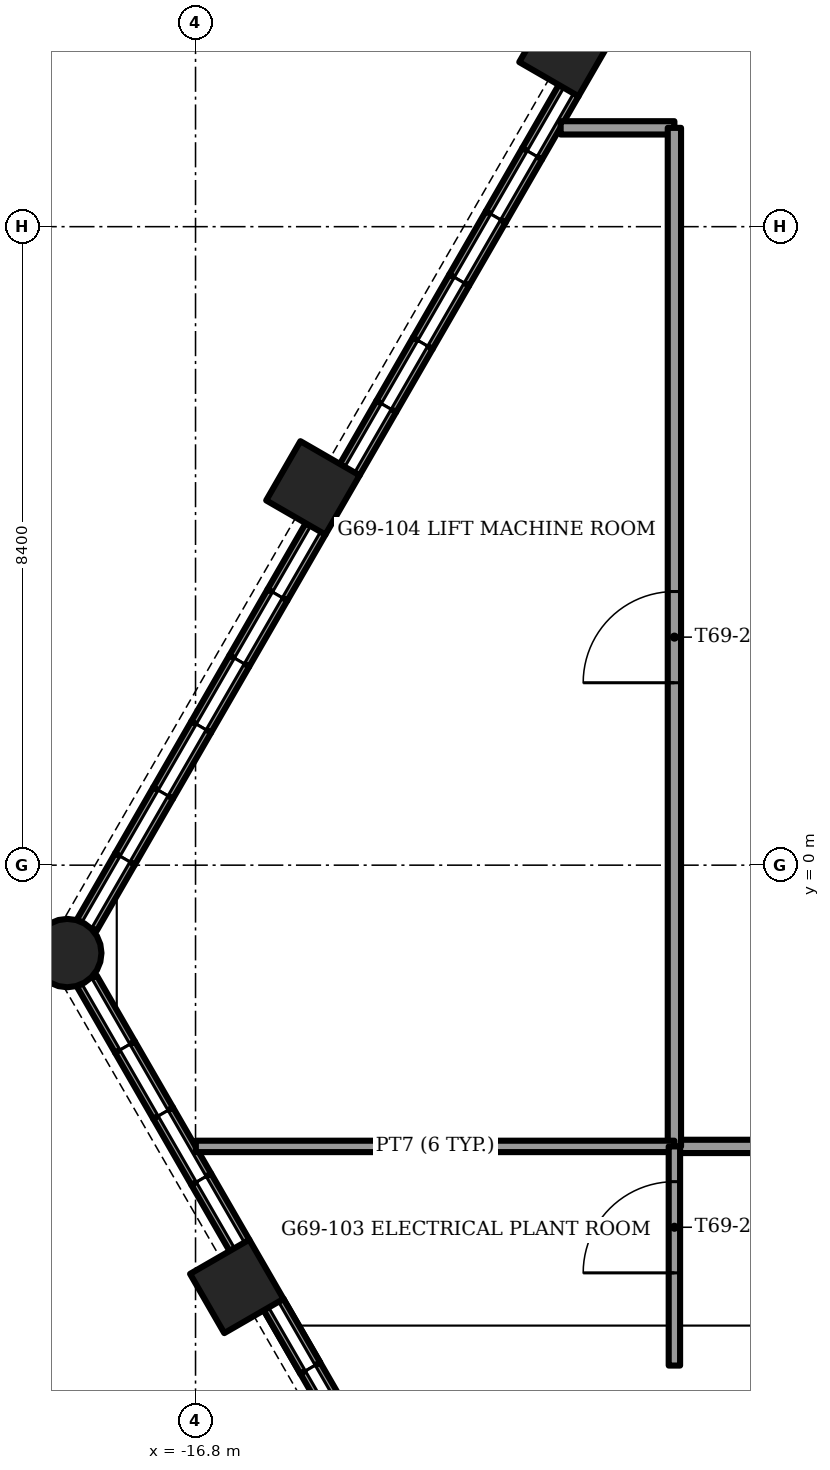
"""IFC4 building model, lengths in metres.
Left out: names, types, materials, properties, quantities, classifications, styles, units other than length and angle.
Written with IfcOpenShell. Run it as: python <this file> out.ifc"""

import sys

from ifc_helpers import new_model, si_unit, direction, frame, frame_2d, origin, origin_2d, place, context, subcontext, project, spatial, rectangle, circle, extrude, element, fill, save


model = new_model("IFC4")
c1 = context("Model", 3, precision=1e-05, world=origin(), true_north=direction((0.0, 1.0)))
c2 = subcontext(c1, "Body", "Model", "MODEL_VIEW")
j1 = project(units=[si_unit("LENGTHUNIT", "METRE"), si_unit("PLANEANGLEUNIT", "RADIAN")], contexts=[c1])
p1 = place(None, origin())
s1 = spatial("IfcSite", under=j1, at=p1, CompositionType="ELEMENT")
p2 = place(p1, origin())
s2 = spatial("IfcBuilding", under=s1, at=p2, CompositionType="ELEMENT")
p3 = place(p2, frame((0.0, 0.0, 279.5)))
s3 = spatial("IfcBuildingStorey", under=s2, at=p3, CompositionType="ELEMENT", Elevation=279.5)
p4 = place(p3, frame((-18.487, -1.156, -1.2), z_axis=(0.0, 0.0, 1.0), x_axis=(1.0, 0.0, 0.0)))
e1 = element("IfcColumn", 1, at=p4, inside=s3, PredefinedType="COLUMN", context=c2, shape_type="SweptSolid", body=[
    extrude(circle(Radius=0.45, at=origin_2d()), origin(), (0.0, 0.0, 1.0), 4.5),
])
for number, where, z_axis, x_axis in (
    (2, (-11.926, 10.73, -1.2), (0.0, 0.0, 1.0), (0.5, 0.866, 0.0)),
    (3, (-15.256, 4.963, -1.2), (0.0, 0.0, 1.0), (0.5, 0.866, 0.0)),
    (4, (-16.257, -5.542, -1.2), (0.0, 0.0, 1.0), (-0.5, 0.866, 0.0)),
):
    element("IfcColumn", number, at=place(p3, frame(where, z_axis=z_axis, x_axis=x_axis)), inside=s3, PredefinedType="COLUMN", context=c2, shape_type="SweptSolid", body=[
        extrude(rectangle(XDim=0.9, YDim=0.9, at=origin_2d()), origin(), (0.0, 0.0, 1.0), 4.5),
    ])
for number, where, z_axis, x_axis in (
    (5, (-11.892, 10.19, 0.0), (0.0, 0.0, 1.0), (-0.5, -0.866, 0.0)),
    (6, (-12.371, 9.359, 0.0), (0.0, 0.0, 1.0), (-0.5, -0.866, 0.0)),
):
    element("IfcWall", number, at=place(p3, frame(where, z_axis=z_axis, x_axis=x_axis)), inside=s3, PredefinedType="SOLIDWALL", context=c2, shape_type="SweptSolid", body=[
        extrude(rectangle(XDim=0.96, YDim=0.3, at=frame_2d((0.48, 0.0))), origin(), (0.0, 0.0, 1.0), 1.0),
    ])
p5 = place(p3, frame((-12.851, 8.528, 0.0), z_axis=(0.0, 0.0, 1.0), x_axis=(-0.500023335103, -0.866011930837, 0.0)))
e7 = element("IfcWall", 7, at=p5, inside=s3, PredefinedType="SOLIDWALL", context=c2, shape_type="SweptSolid", body=[
    extrude(rectangle(XDim=0.96, YDim=0.3, at=frame_2d((0.48, 0.0))), origin(), (0.0, 0.0, 1.0), 1.0),
])
p6 = place(p3, frame((-13.331, 7.697, 0.0), z_axis=(0.0, 0.0, 1.0), x_axis=(-0.499832553123, -0.866122057702, 0.0)))
e8 = element("IfcWall", 8, at=p6, inside=s3, PredefinedType="SOLIDWALL", context=c2, shape_type="SweptSolid", body=[
    extrude(rectangle(XDim=0.96, YDim=0.3, at=frame_2d((0.48, 0.0))), origin(), (0.0, 0.0, 1.0), 1.0),
])
p7 = place(p3, frame((-13.811, 6.865, 0.0), z_axis=(0.0, 0.0, 1.0), x_axis=(-0.500023335103, -0.866011930837, 0.0)))
e9 = element("IfcWall", 9, at=p7, inside=s3, PredefinedType="SOLIDWALL", context=c2, shape_type="SweptSolid", body=[
    extrude(rectangle(XDim=0.96, YDim=0.3, at=frame_2d((0.48, 0.0))), origin(), (0.0, 0.0, 1.0), 1.0),
])
p8 = place(p3, frame((-14.291, 6.034, 0.0), z_axis=(0.0, 0.0, 1.0), x_axis=(-0.500133489192, -0.865948320045, 0.0)))
e10 = element("IfcWall", 10, at=p8, inside=s3, PredefinedType="SOLIDWALL", context=c2, shape_type="SweptSolid", body=[
    extrude(rectangle(XDim=0.96, YDim=0.3, at=frame_2d((0.48, 0.0))), origin(), (0.0, 0.0, 1.0), 1.0),
])
p9 = place(p3, frame((-15.221, 4.424, 0.0), z_axis=(0.0, 0.0, 1.0), x_axis=(-0.499961250474, -0.866047774678, 0.0)))
e11 = element("IfcWall", 11, at=p9, inside=s3, PredefinedType="SOLIDWALL", context=c2, shape_type="SweptSolid", body=[
    extrude(rectangle(XDim=1.003, YDim=0.3, at=frame_2d((0.501, 0.0))), origin(), (0.0, 0.0, 1.0), 1.0),
])
p10 = place(p3, frame((-15.722, 3.555, 0.0), z_axis=(0.0, 0.0, 1.0), x_axis=(-0.500143783026, -0.865942374699, 0.0)))
e12 = element("IfcWall", 12, at=p10, inside=s3, PredefinedType="SOLIDWALL", context=c2, shape_type="SweptSolid", body=[
    extrude(rectangle(XDim=1.003, YDim=0.3, at=frame_2d((0.501, 0.0))), origin(), (0.0, 0.0, 1.0), 1.0),
])
for number, where, z_axis, x_axis in (
    (13, (-16.224, 2.686, 0.0), (0.0, 0.0, 1.0), (-0.5, -0.866, 0.0)),
    (14, (-16.726, 1.818, 0.0), (0.0, 0.0, 1.0), (-0.5, -0.866, 0.0)),
    (15, (-17.227, 0.949, 0.0), (0.0, 0.0, 1.0), (-0.5, -0.866, 0.0)),
    (16, (-17.729, 0.08, 0.0), (0.0, 0.0, 1.0), (-0.5, -0.866, 0.0)),
):
    element("IfcWall", number, at=place(p3, frame(where, z_axis=z_axis, x_axis=x_axis)), inside=s3, PredefinedType="SOLIDWALL", context=c2, shape_type="SweptSolid", body=[
        extrude(rectangle(XDim=1.003, YDim=0.3, at=frame_2d((0.501, 0.0))), origin(), (0.0, 0.0, 1.0), 1.0),
    ])
p11 = place(p3, frame((-18.23, -1.525, 0.0), z_axis=(0.0, 0.0, 1.0), x_axis=(0.500010157896, -0.866019539041, 0.0)))
e17 = element("IfcWall", 17, at=p11, inside=s3, PredefinedType="SOLIDWALL", context=c2, shape_type="SweptSolid", body=[
    extrude(rectangle(XDim=1.004, YDim=0.3, at=frame_2d((0.502, 0.0))), origin(), (0.0, 0.0, 1.0), 1.0),
])
p12 = place(p3, frame((-17.728, -2.394, 0.0), z_axis=(0.0, 0.0, 1.0), x_axis=(0.499933044277, -0.866064057238, 0.0)))
e18 = element("IfcWall", 18, at=p12, inside=s3, PredefinedType="SOLIDWALL", context=c2, shape_type="SweptSolid", body=[
    extrude(rectangle(XDim=1.004, YDim=0.3, at=frame_2d((0.502, 0.0))), origin(), (0.0, 0.0, 1.0), 1.0),
])
p13 = place(p3, frame((-17.226, -3.263, 0.0), z_axis=(0.0, 0.0, 1.0), x_axis=(0.499904868165, -0.866080321209, 0.0)))
e19 = element("IfcWall", 19, at=p13, inside=s3, PredefinedType="SOLIDWALL", context=c2, shape_type="SweptSolid", body=[
    extrude(rectangle(XDim=1.004, YDim=0.3, at=frame_2d((0.502, 0.0))), origin(), (0.0, 0.0, 1.0), 1.0),
])
p14 = place(p3, frame((-16.724, -4.133, 0.0), z_axis=(0.0, 0.0, 1.0), x_axis=(0.500115484592, -0.865958718457, 0.0)))
e20 = element("IfcWall", 20, at=p14, inside=s3, PredefinedType="SOLIDWALL", context=c2, shape_type="SweptSolid", body=[
    extrude(rectangle(XDim=1.004, YDim=0.3, at=frame_2d((0.502, 0.0))), origin(), (0.0, 0.0, 1.0), 1.0),
])
p15 = place(p3, frame((-15.772, -5.781, 0.0), z_axis=(0.0, 0.0, 1.0), x_axis=(0.500058339205, -0.865991719008, 0.0)))
e21 = element("IfcWall", 21, at=p15, inside=s3, PredefinedType="SOLIDWALL", context=c2, shape_type="SweptSolid", body=[
    extrude(rectangle(XDim=0.965, YDim=0.3, at=frame_2d((0.482, 0.0))), origin(), (0.0, 0.0, 1.0), 1.0),
])
p16 = place(p3, frame((-15.772, -5.781, 3.3), z_axis=(0.0, 0.0, 1.0), x_axis=(0.500058339205, -0.865991719008, 0.0)))
e22 = element("IfcWall", 22, at=p16, inside=s3, PredefinedType="SOLIDWALL", context=c2, shape_type="SweptSolid", body=[
    extrude(rectangle(XDim=0.965, YDim=0.3, at=frame_2d((0.482, 0.0))), origin(), (0.0, 0.0, 1.0), 0.273),
])
p17 = place(p3, frame((-15.29, -6.617, 0.0), z_axis=(0.0, 0.0, 1.0), x_axis=(0.500058339205, -0.865991719008, 0.0)))
e23 = element("IfcWall", 23, at=p17, inside=s3, PredefinedType="SOLIDWALL", context=c2, shape_type="SweptSolid", body=[
    extrude(rectangle(XDim=0.965, YDim=0.3, at=frame_2d((0.482, 0.0))), origin(), (0.0, 0.0, 1.0), 1.0),
])
p18 = place(p3, frame((-10.5, -3.7, 0.0), z_axis=(0.0, 0.0, 1.0), x_axis=(1.0, 0.0, 0.0)))
e24 = element("IfcWall", 24, at=p18, inside=s3, PredefinedType="PARTITIONING", context=c2, shape_type="SweptSolid", body=[
    extrude(rectangle(XDim=21.0, YDim=0.175, at=frame_2d((10.5, 0.0))), origin(), (0.0, 0.0, 1.0), 4.2),
])
p19 = place(p18, frame((4.65, 0.0, 0.0)))
e25 = element("IfcOpeningElement", 25, at=p19, cuts=e24, PredefinedType="OPENING", context=c2, shape_type="SweptSolid", body=[
    extrude(rectangle(XDim=1.2, YDim=2.1, at=frame_2d((0.6, 1.05))), frame((0.0, 0.087, 0.0), z_axis=(0.0, -1.0, 0.0), x_axis=(1.0, 0.0, 0.0)), (0.0, 0.0, 1.0), 0.175),
])
p20 = place(p18, frame((15.15, 0.0, 0.0)))
e26 = element("IfcOpeningElement", 26, at=p20, cuts=e24, PredefinedType="OPENING", context=c2, shape_type="SweptSolid", body=[
    extrude(rectangle(XDim=1.2, YDim=2.1, at=frame_2d((0.6, 1.05))), frame((0.0, 0.087, 0.0), z_axis=(0.0, -1.0, 0.0), x_axis=(1.0, 0.0, 0.0)), (0.0, 0.0, 1.0), 0.175),
])
p21 = place(p3, frame((-11.996, 9.7, 0.0), z_axis=(0.0, 0.0, 1.0), x_axis=(1.0, 0.0, 0.0)))
e27 = element("IfcWall", 27, at=p21, inside=s3, PredefinedType="PARTITIONING", context=c2, shape_type="SweptSolid", body=[
    extrude(rectangle(XDim=1.496, YDim=0.175, at=frame_2d((0.748, 0.0))), origin(), (0.0, 0.0, 1.0), 4.2),
])
p22 = place(p3, frame((-10.5, -3.7, 0.0), z_axis=(0.0, 0.0, 1.0), x_axis=(0.0, 1.0, 0.0)))
e28 = element("IfcWall", 28, at=p22, inside=s3, PredefinedType="PARTITIONING", context=c2, shape_type="SweptSolid", body=[
    extrude(rectangle(XDim=13.4, YDim=0.175, at=frame_2d((6.7, 0.0))), origin(), (0.0, 0.0, 1.0), 4.2),
])
p23 = place(p22, frame((6.1, 0.0, 0.0)))
e29 = element("IfcOpeningElement", 29, at=p23, cuts=e28, PredefinedType="OPENING", context=c2, shape_type="SweptSolid", body=[
    extrude(rectangle(XDim=1.2, YDim=2.1, at=frame_2d((0.6, 1.05))), frame((0.0, 0.087, 0.0), z_axis=(0.0, -1.0, 0.0), x_axis=(1.0, 0.0, 0.0)), (0.0, 0.0, 1.0), 0.175),
])
p24 = place(p3, frame((-16.796, -3.7, 0.0), z_axis=(0.0, 0.0, 1.0), x_axis=(1.0, 0.0, 0.0)))
e30 = element("IfcWall", 30, at=p24, inside=s3, PredefinedType="PARTITIONING", context=c2, shape_type="SweptSolid", body=[
    extrude(rectangle(XDim=6.296, YDim=0.15, at=frame_2d((3.148, 0.0))), origin(), (0.0, 0.0, 1.0), 4.2),
])
p25 = place(p3, frame((-10.5, -6.583, 0.0), z_axis=(0.0, 0.0, 1.0), x_axis=(0.0, 1.0, 0.0)))
e31 = element("IfcWall", 31, at=p25, inside=s3, PredefinedType="PARTITIONING", context=c2, shape_type="SweptSolid", body=[
    extrude(rectangle(XDim=2.883, YDim=0.15, at=frame_2d((1.442, 0.0))), origin(), (0.0, 0.0, 1.0), 4.155),
])
p26 = place(p25, frame((1.219, 0.0, 0.0)))
e32 = element("IfcOpeningElement", 32, at=p26, cuts=e31, PredefinedType="OPENING", context=c2, shape_type="SweptSolid", body=[
    extrude(rectangle(XDim=1.2, YDim=2.1, at=frame_2d((0.6, 1.05))), frame((0.0, 0.075, 0.0), z_axis=(0.0, -1.0, 0.0), x_axis=(1.0, 0.0, 0.0)), (0.0, 0.0, 1.0), 0.15),
])
p27 = place(p26, origin())
e33 = element("IfcDoor", 33, at=p27, inside=s3, OperationType="SINGLE_SWING_RIGHT", PredefinedType="DOOR", context=c2, shape_type="SweptSolid", body=[
    extrude(rectangle(XDim=1.2, YDim=2.1, at=frame_2d((0.6, 1.05))), frame((0.0, 0.025, 0.0), z_axis=(0.0, -1.0, 0.0), x_axis=(1.0, 0.0, 0.0)), (0.0, 0.0, 1.0), 0.05),
])
fill(e32, e33)
p28 = place(p23, origin())
e34 = element("IfcDoor", 34, at=p28, inside=s3, OperationType="SINGLE_SWING_LEFT", PredefinedType="DOOR", context=c2, shape_type="SweptSolid", body=[
    extrude(rectangle(XDim=1.2, YDim=2.1, at=frame_2d((0.6, 1.05))), frame((0.0, 0.025, 0.0), z_axis=(0.0, -1.0, 0.0), x_axis=(1.0, 0.0, 0.0)), (0.0, 0.0, 1.0), 0.05),
])
fill(e29, e34)
save(model, sys.argv[1])
